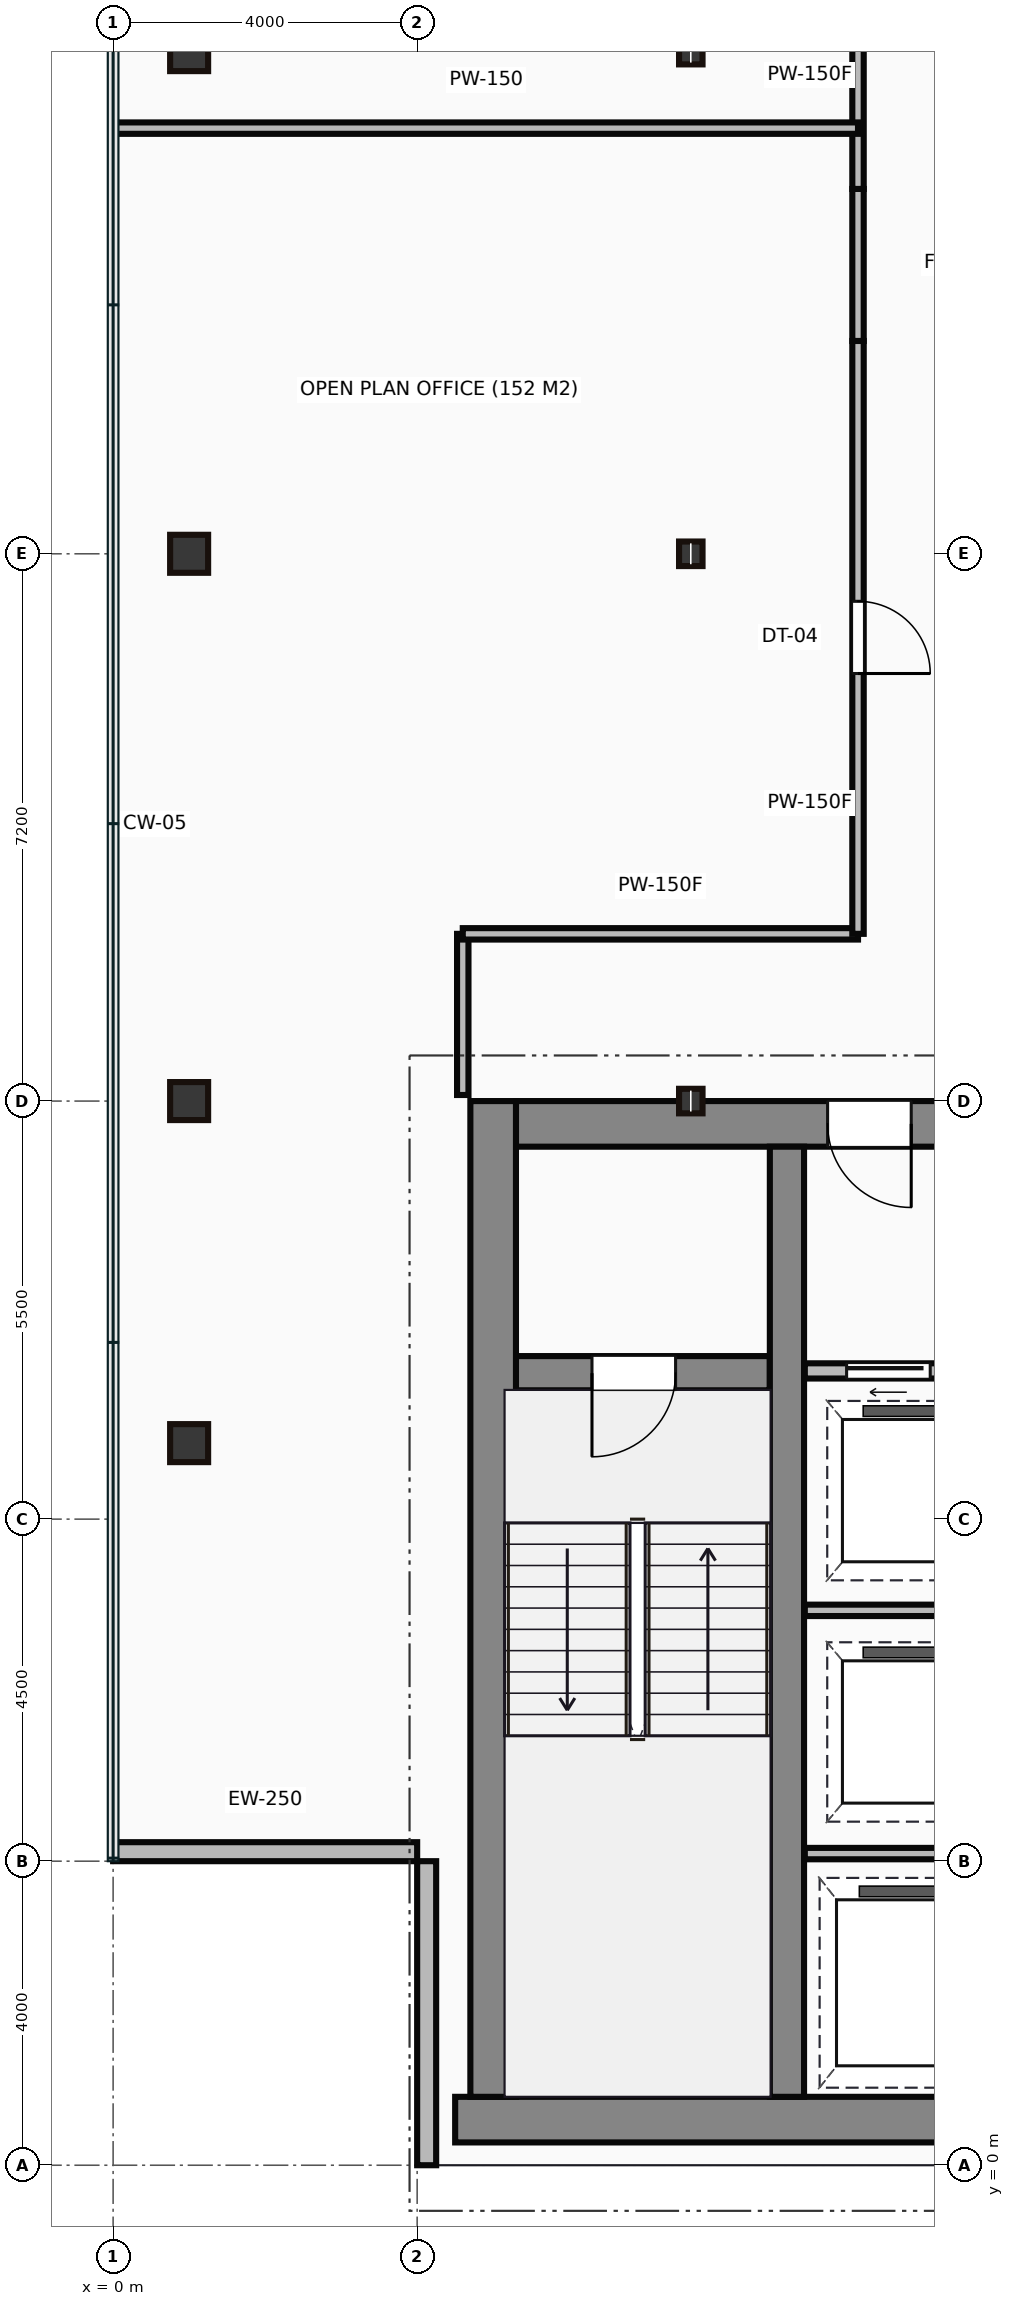
"""IFC4 building model, lengths in metres.
Left out: names, types, materials, properties, quantities, classifications, styles, units other than length and angle.
Written with IfcOpenShell. Run it as: python <this file> out.ifc"""

import sys

from ifc_helpers import new_model, si_unit, direction, frame, frame_2d, origin, origin_2d, place, context, subcontext, project, spatial, rectangle, hollow_rectangle, i_section, extrude, source, transform, mapped, element, fill, save


model = new_model("IFC4")
c1 = context("Model", 3, precision=1e-05, world=origin(), true_north=direction((0.0, 1.0)))
c2 = subcontext(c1, "Body", "Model", "MODEL_VIEW")
j1 = project(units=[si_unit("LENGTHUNIT", "METRE"), si_unit("PLANEANGLEUNIT", "RADIAN")], contexts=[c1])
p1 = place(None, origin())
s1 = spatial("IfcSite", under=j1, at=p1, CompositionType="ELEMENT")
p2 = place(p1, origin())
s2 = spatial("IfcBuilding", under=s1, at=p2, CompositionType="ELEMENT")
p3 = place(p2, frame((0.0, 0.0, 266.1)))
s3 = spatial("IfcBuildingStorey", under=s2, at=p3, CompositionType="ELEMENT", Elevation=266.1)
m1 = source(origin(), c2, "Body", "SweptSolid", [
    extrude(rectangle(XDim=29.5, YDim=0.6, at=frame_2d((14.75, 0.0))), origin(), (0.0, 0.0, 1.0), 3.65),
])
p4 = place(p3, frame((4.5, 0.6, 0.0), z_axis=(0.0, 0.0, 1.0), x_axis=(1.0, 0.0, 0.0)))
e1 = element("IfcWall", 1, at=p4, inside=s3, PredefinedType="SHEAR", context=c2, shape_type="MappedRepresentation", body=[
    mapped(m1, transform((0.0, 0.0, 0.0))),
])
m2 = source(origin(), c2, "Body", "SweptSolid", [
    extrude(rectangle(XDim=13.1, YDim=0.6, at=frame_2d((6.55, 0.0))), origin(), (0.0, 0.0, 1.0), 3.65),
])
p5 = place(p3, frame((5.0, 0.9, 0.0), z_axis=(0.0, 0.0, 1.0), x_axis=(0.0, 1.0, 0.0)))
e2 = element("IfcWall", 2, at=p5, inside=s3, PredefinedType="SHEAR", context=c2, shape_type="MappedRepresentation", body=[
    mapped(m2, transform((0.0, 0.0, 0.0))),
])
m3 = source(origin(), c2, "Body", "SweptSolid", [
    extrude(rectangle(XDim=9.1, YDim=0.6, at=frame_2d((4.55, 0.0))), origin(), (0.0, 0.0, 1.0), 3.65),
])
p6 = place(p3, frame((5.3, 13.7, 0.0), z_axis=(0.0, 0.0, 1.0), x_axis=(1.0, 0.0, 0.0)))
e3 = element("IfcWall", 3, at=p6, inside=s3, PredefinedType="SHEAR", context=c2, shape_type="MappedRepresentation", body=[
    mapped(m3, transform((0.0, 0.0, 0.0))),
])
p7 = place(p6, frame((4.1, 0.0, 0.0)))
e4 = element("IfcOpeningElement", 4, at=p7, cuts=e3, PredefinedType="OPENING", context=c2, shape_type="SweptSolid", body=[
    extrude(rectangle(XDim=1.1, YDim=2.15, at=frame_2d((0.55, 1.075))), frame((0.0, 0.31, 0.0), z_axis=(0.0, -1.0, 0.0), x_axis=(1.0, 0.0, 0.0)), (0.0, 0.0, 1.0), 0.62),
])
m4 = source(origin(), c2, "Body", "SweptSolid", [
    extrude(rectangle(XDim=12.5, YDim=0.45, at=frame_2d((6.25, 0.0))), origin(), (0.0, 0.0, 1.0), 3.65),
])
p8 = place(p3, frame((8.865, 0.9, 0.0), z_axis=(0.0, 0.0, 1.0), x_axis=(0.0, 1.0, 0.0)))
e5 = element("IfcWall", 5, at=p8, inside=s3, PredefinedType="SHEAR", context=c2, shape_type="MappedRepresentation", body=[
    mapped(m4, transform((0.0, 0.0, 0.0))),
])
m5 = source(origin(), c2, "Body", "SweptSolid", [
    extrude(rectangle(XDim=3.39, YDim=0.45, at=frame_2d((1.695, 0.0))), origin(), (0.0, 0.0, 1.0), 3.65),
])
p9 = place(p3, frame((5.25, 10.42, 0.0), z_axis=(0.0, 0.0, 1.0), x_axis=(1.0, 0.0, 0.0)))
e6 = element("IfcWall", 6, at=p9, inside=s3, PredefinedType="SHEAR", context=c2, shape_type="MappedRepresentation", body=[
    mapped(m5, transform((0.0, 0.0, 0.0))),
])
p10 = place(p9, frame((1.05, 0.0, 0.0)))
e7 = element("IfcOpeningElement", 7, at=p10, cuts=e6, PredefinedType="OPENING", context=c2, shape_type="SweptSolid", body=[
    extrude(rectangle(XDim=1.1, YDim=2.15, at=frame_2d((0.55, 1.075))), frame((0.0, 0.235, 0.0), z_axis=(0.0, -1.0, 0.0), x_axis=(1.0, 0.0, 0.0)), (0.0, 0.0, 1.0), 0.47),
])
m6 = source(origin(), c2, "Body", "SweptSolid", [
    extrude(hollow_rectangle(XDim=0.5, YDim=0.5, WallThickness=0.022, at=origin_2d()), origin(), (0.0, 0.0, 1.0), 3.65),
])
for number, where, z_axis, x_axis in (
    (8, (1.0, 9.5, 0.0), (0.0, 0.0, 1.0), (1.0, 0.0, 0.0)),
    (9, (1.0, 14.0, 0.0), (0.0, 0.0, 1.0), (1.0, 0.0, 0.0)),
    (10, (1.0, 21.2, 0.0), (0.0, 0.0, 1.0), (1.0, 0.0, 0.0)),
    (11, (1.0, 27.8, 0.0), (0.0, 0.0, 1.0), (1.0, 0.0, 0.0)),
):
    element("IfcColumn", number, at=place(p3, frame(where, z_axis=z_axis, x_axis=x_axis)), inside=s3, PredefinedType="COLUMN", context=c2, shape_type="MappedRepresentation", body=[
        mapped(m6, transform((0.0, 0.0, 0.0))),
    ])
m7 = source(origin(), c2, "Body", "SweptSolid", [
    extrude(i_section(OverallWidth=0.309, OverallDepth=0.323, WebThickness=0.014, FlangeThickness=0.023, at=origin_2d()), origin(), (0.0, 0.0, 1.0), 3.65),
])
for number, where, z_axis, x_axis in (
    (12, (7.6, 14.0, 0.0), (0.0, 0.0, 1.0), (1.0, 0.0, 0.0)),
    (13, (7.6, 21.2, 0.0), (0.0, 0.0, 1.0), (1.0, 0.0, 0.0)),
    (14, (7.6, 27.8, 0.0), (0.0, 0.0, 1.0), (1.0, 0.0, 0.0)),
):
    element("IfcColumn", number, at=place(p3, frame(where, z_axis=z_axis, x_axis=x_axis)), inside=s3, PredefinedType="COLUMN", context=c2, shape_type="MappedRepresentation", body=[
        mapped(m7, transform((0.0, 0.0, 0.0))),
    ])
m8 = source(origin(), c2, "Body", "SweptSolid", [
    extrude(rectangle(XDim=4.0, YDim=0.25, at=frame_2d((2.0, 0.0))), origin(), (0.0, 0.0, 1.0), 3.4),
])
for number, where, z_axis, x_axis in (
    (15, (0.0, 4.125, 0.0), (0.0, 0.0, 1.0), (1.0, 0.0, 0.0)),
    (16, (4.125, 4.0, 0.0), (0.0, 0.0, 1.0), (0.0, -1.0, 0.0)),
):
    element("IfcWall", number, at=place(p3, frame(where, z_axis=z_axis, x_axis=x_axis)), inside=s3, PredefinedType="STANDARD", context=c2, shape_type="MappedRepresentation", body=[
        mapped(m8, transform((0.0, 0.0, 0.0))),
    ])
m9 = source(origin(), c2, "Body", "SweptSolid", [
    extrude(rectangle(XDim=2.35, YDim=0.2, at=frame_2d((1.175, 0.0))), origin(), (0.0, 0.0, 1.0), 3.4),
])
p11 = place(p3, frame((9.1, 10.45, 0.0), z_axis=(0.0, 0.0, 1.0), x_axis=(1.0, 0.0, 0.0)))
e17 = element("IfcWall", 17, at=p11, inside=s3, PredefinedType="PARTITIONING", context=c2, shape_type="MappedRepresentation", body=[
    mapped(m9, transform((0.0, 0.0, 0.0))),
])
p12 = place(p11, frame((0.55, 0.0, 0.0)))
e18 = element("IfcOpeningElement", 18, at=p12, cuts=e17, PredefinedType="OPENING", context=c2, shape_type="SweptSolid", body=[
    extrude(rectangle(XDim=1.1, YDim=2.15, at=frame_2d((0.55, 1.075))), frame((0.0, 0.11, 0.0), z_axis=(0.0, -1.0, 0.0), x_axis=(1.0, 0.0, 0.0)), (0.0, 0.0, 1.0), 0.22),
])
m10 = source(origin(), c2, "Body", "SweptSolid", [
    extrude(rectangle(XDim=2.4, YDim=0.15, at=frame_2d((1.2, 0.0))), origin(), (0.0, 0.0, 1.0), 3.4),
])
for number, where, z_axis, x_axis in (
    (19, (9.1, 4.1, 0.0), (0.0, 0.0, 1.0), (1.0, 0.0, 0.0)),
    (20, (9.1, 7.3, 0.0), (0.0, 0.0, 1.0), (1.0, 0.0, 0.0)),
):
    element("IfcWall", number, at=place(p3, frame(where, z_axis=z_axis, x_axis=x_axis)), inside=s3, PredefinedType="PARTITIONING", context=c2, shape_type="MappedRepresentation", body=[
        mapped(m10, transform((0.0, 0.0, 0.0))),
    ])
m11 = source(origin(), c2, "Body", "SweptSolid", [
    extrude(rectangle(XDim=2.12, YDim=0.15, at=frame_2d((1.06, 0.0))), origin(), (0.0, 0.0, 1.0), 3.4),
])
p13 = place(p3, frame((4.6, 14.08, 0.0), z_axis=(0.0, 0.0, 1.0), x_axis=(0.0, 1.0, 0.0)))
e21 = element("IfcWall", 21, at=p13, inside=s3, PredefinedType="PARTITIONING", context=c2, shape_type="MappedRepresentation", body=[
    mapped(m11, transform((0.0, 0.0, 0.0))),
])
m12 = source(origin(), c2, "Body", "SweptSolid", [
    extrude(rectangle(XDim=5.2, YDim=0.15, at=frame_2d((2.6, 0.0))), origin(), (0.0, 0.0, 1.0), 3.4),
])
p14 = place(p3, frame((4.6, 16.2, 0.0), z_axis=(0.0, 0.0, 1.0), x_axis=(1.0, 0.0, 0.0)))
e22 = element("IfcWall", 22, at=p14, inside=s3, PredefinedType="PARTITIONING", context=c2, shape_type="MappedRepresentation", body=[
    mapped(m12, transform((0.0, 0.0, 0.0))),
])
m13 = source(origin(), c2, "Body", "SweptSolid", [
    extrude(rectangle(XDim=7.8, YDim=0.15, at=frame_2d((3.9, 0.0))), origin(), (0.0, 0.0, 1.0), 3.4),
])
p15 = place(p3, frame((9.8, 16.2, 0.0), z_axis=(0.0, 0.0, 1.0), x_axis=(0.0, 1.0, 0.0)))
e23 = element("IfcWall", 23, at=p15, inside=s3, PredefinedType="PARTITIONING", context=c2, shape_type="MappedRepresentation", body=[
    mapped(m13, transform((0.0, 0.0, 0.0))),
])
p16 = place(p15, frame((3.425, 0.0, 0.0)))
e24 = element("IfcOpeningElement", 24, at=p16, cuts=e23, PredefinedType="OPENING", context=c2, shape_type="SweptSolid", body=[
    extrude(rectangle(XDim=0.95, YDim=2.15, at=frame_2d((0.475, 1.075))), frame((0.0, 0.085, 0.0), z_axis=(0.0, -1.0, 0.0), x_axis=(1.0, 0.0, 0.0)), (0.0, 0.0, 1.0), 0.17),
])
m14 = source(origin(), c2, "Body", "SweptSolid", [
    extrude(rectangle(XDim=2.0, YDim=0.15, at=frame_2d((1.0, 0.0))), origin(), (0.0, 0.0, 1.0), 3.4),
])
p17 = place(p3, frame((9.8, 24.0, 0.0), z_axis=(0.0, 0.0, 1.0), x_axis=(0.0, 1.0, 0.0)))
e25 = element("IfcWall", 25, at=p17, inside=s3, PredefinedType="PARTITIONING", context=c2, shape_type="MappedRepresentation", body=[
    mapped(m14, transform((0.0, 0.0, 0.0))),
])
m15 = source(origin(), c2, "Body", "SweptSolid", [
    extrude(rectangle(XDim=6.8, YDim=0.15, at=frame_2d((3.4, 0.0))), origin(), (0.0, 0.0, 1.0), 3.4),
])
p18 = place(p3, frame((9.8, 26.0, 0.0), z_axis=(0.0, 0.0, 1.0), x_axis=(0.0, 1.0, 0.0)))
e26 = element("IfcWall", 26, at=p18, inside=s3, PredefinedType="PARTITIONING", context=c2, shape_type="MappedRepresentation", body=[
    mapped(m15, transform((0.0, 0.0, 0.0))),
])
p19 = place(p18, frame((3.195, 0.0, 0.0)))
e27 = element("IfcOpeningElement", 27, at=p19, cuts=e26, PredefinedType="OPENING", context=c2, shape_type="SweptSolid", body=[
    extrude(rectangle(XDim=0.95, YDim=2.15, at=frame_2d((0.475, 1.075))), frame((0.0, 0.085, 0.0), z_axis=(0.0, -1.0, 0.0), x_axis=(1.0, 0.0, 0.0)), (0.0, 0.0, 1.0), 0.17),
])
m16 = source(origin(), c2, "Body", "SweptSolid", [
    extrude(rectangle(XDim=9.78, YDim=0.15, at=frame_2d((4.89, 0.0))), origin(), (0.0, 0.0, 1.0), 3.4),
])
p20 = place(p3, frame((0.02, 26.8, 0.0), z_axis=(0.0, 0.0, 1.0), x_axis=(1.0, 0.0, 0.0)))
e28 = element("IfcWall", 28, at=p20, inside=s3, PredefinedType="PARTITIONING", context=c2, shape_type="MappedRepresentation", body=[
    mapped(m16, transform((0.0, 0.0, 0.0))),
])
m17 = source(origin(), c2, "Body", "SweptSolid", [
    extrude(rectangle(XDim=1.1, YDim=2.15, at=frame_2d((0.55, 1.075))), frame((0.0, 0.025, 0.0), z_axis=(0.0, -1.0, 0.0), x_axis=(1.0, 0.0, 0.0)), (0.0, 0.0, 1.0), 0.05),
])
p21 = place(p10, frame((1.1, 0.0, 0.0), z_axis=(0.0, 0.0, 1.0), x_axis=(-1.0, 0.0, 0.0)))
e29 = element("IfcDoor", 29, at=p21, inside=s3, OperationType="SINGLE_SWING_LEFT", PredefinedType="DOOR", context=c2, shape_type="MappedRepresentation", body=[
    mapped(m17, transform((0.0, 0.0, 0.0))),
])
fill(e7, e29)
p22 = place(p7, origin())
e30 = element("IfcDoor", 30, at=p22, inside=s3, OperationType="SINGLE_SWING_RIGHT", PredefinedType="DOOR", context=c2, shape_type="MappedRepresentation", body=[
    mapped(m17, transform((0.0, 0.0, 0.0))),
])
fill(e4, e30)
p23 = place(p12, origin())
e31 = element("IfcDoor", 31, at=p23, inside=s3, OperationType="SLIDING_TO_LEFT", PredefinedType="DOOR", context=c2, shape_type="MappedRepresentation", body=[
    mapped(m17, transform((0.0, 0.0, 0.0))),
])
fill(e18, e31)
m18 = source(origin(), c2, "Body", "SweptSolid", [
    extrude(rectangle(XDim=0.95, YDim=2.15, at=frame_2d((0.475, 1.075))), frame((0.0, 0.025, 0.0), z_axis=(0.0, -1.0, 0.0), x_axis=(1.0, 0.0, 0.0)), (0.0, 0.0, 1.0), 0.05),
])
p24 = place(p16, origin())
e32 = element("IfcDoor", 32, at=p24, inside=s3, OperationType="SINGLE_SWING_LEFT", PredefinedType="DOOR", context=c2, shape_type="MappedRepresentation", body=[
    mapped(m18, transform((0.0, 0.0, 0.0))),
])
fill(e24, e32)
save(model, sys.argv[1])
